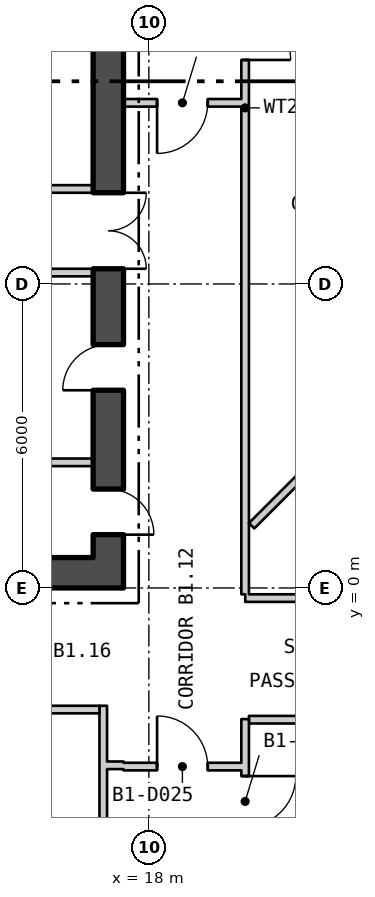
"""IFC4 building model, lengths in metres.
Left out: names, types, materials, properties, quantities, classifications, styles, units other than length and angle.
Written with IfcOpenShell. Run it as: python <this file> out.ifc"""

import sys

from ifc_helpers import new_model, si_unit, direction, frame, frame_2d, origin, place, context, subcontext, project, spatial, rectangle, extrude, element, fill, save


model = new_model("IFC4")
c1 = context("Model", 3, precision=1e-05, world=origin(), true_north=direction((0.0, 1.0)))
c2 = subcontext(c1, "Body", "Model", "MODEL_VIEW")
j1 = project(units=[si_unit("LENGTHUNIT", "METRE"), si_unit("PLANEANGLEUNIT", "RADIAN")], contexts=[c1])
p1 = place(None, origin())
s1 = spatial("IfcSite", under=j1, at=p1, CompositionType="ELEMENT")
p2 = place(p1, origin())
s2 = spatial("IfcBuilding", under=s1, at=p2, CompositionType="ELEMENT")
p3 = place(p2, frame((0.0, 0.0, -5.7)))
s3 = spatial("IfcBuildingStorey", under=s2, at=p3, CompositionType="ELEMENT", Elevation=-5.7)
p4 = place(p3, frame((-17.5, 0.3, 0.0), z_axis=(0.0, 0.0, 1.0), x_axis=(1.0, 0.0, 0.0)))
e1 = element("IfcWall", 1, at=p4, inside=s3, PredefinedType="SHEAR", context=c2, shape_type="SweptSolid", body=[
    extrude(rectangle(XDim=35.0, YDim=0.6, at=frame_2d((17.5, 0.0))), origin(), (0.0, 0.0, 1.0), 5.25),
])
p5 = place(p4, frame((12.0, 0.0, 0.0)))
e2 = element("IfcOpeningElement", 2, at=p5, cuts=e1, PredefinedType="OPENING", context=c2, shape_type="SweptSolid", body=[
    extrude(rectangle(XDim=1.8, YDim=2.4, at=frame_2d((0.9, 1.2))), frame((0.0, 0.31, 0.0), z_axis=(0.0, -1.0, 0.0), x_axis=(1.0, 0.0, 0.0)), (0.0, 0.0, 1.0), 0.62),
])
p6 = place(p4, frame((22.0, 0.0, 0.0)))
e3 = element("IfcOpeningElement", 3, at=p6, cuts=e1, PredefinedType="OPENING", context=c2, shape_type="SweptSolid", body=[
    extrude(rectangle(XDim=1.8, YDim=2.4, at=frame_2d((0.9, 1.2))), frame((0.0, 0.31, 0.0), z_axis=(0.0, -1.0, 0.0), x_axis=(1.0, 0.0, 0.0)), (0.0, 0.0, 1.0), 0.62),
])
p7 = place(p3, frame((17.2, 0.6, 0.0), z_axis=(0.0, 0.0, 1.0), x_axis=(0.0, 1.0, 0.0)))
e4 = element("IfcWall", 4, at=p7, inside=s3, PredefinedType="SHEAR", context=c2, shape_type="SweptSolid", body=[
    extrude(rectangle(XDim=16.8, YDim=0.6, at=frame_2d((8.4, 0.0))), origin(), (0.0, 0.0, 1.0), 5.25),
])
p8 = place(p7, frame((5.7, 0.0, 0.0)))
e5 = element("IfcOpeningElement", 5, at=p8, cuts=e4, PredefinedType="OPENING", context=c2, shape_type="SweptSolid", body=[
    extrude(rectangle(XDim=1.5, YDim=2.1, at=frame_2d((0.75, 1.05))), frame((0.0, 0.31, 0.0), z_axis=(0.0, -1.0, 0.0), x_axis=(1.0, 0.0, 0.0)), (0.0, 0.0, 1.0), 0.62),
])
p9 = place(p7, frame((0.452, 0.0, 0.0)))
e6 = element("IfcOpeningElement", 6, at=p9, cuts=e4, PredefinedType="OPENING", context=c2, shape_type="SweptSolid", body=[
    extrude(rectangle(XDim=0.9, YDim=2.1, at=frame_2d((0.45, 1.05))), frame((0.0, 0.31, 0.0), z_axis=(0.0, -1.0, 0.0), x_axis=(1.0, 0.0, 0.0)), (0.0, 0.0, 1.0), 0.62),
])
p10 = place(p7, frame((3.302, 0.0, 0.0)))
e7 = element("IfcOpeningElement", 7, at=p10, cuts=e4, PredefinedType="OPENING", context=c2, shape_type="SweptSolid", body=[
    extrude(rectangle(XDim=0.9, YDim=2.1, at=frame_2d((0.45, 1.05))), frame((0.0, 0.31, 0.0), z_axis=(0.0, -1.0, 0.0), x_axis=(1.0, 0.0, 0.0)), (0.0, 0.0, 1.0), 0.62),
])
p11 = place(p7, frame((10.697, 0.0, 0.0)))
e8 = element("IfcOpeningElement", 8, at=p11, cuts=e4, PredefinedType="OPENING", context=c2, shape_type="SweptSolid", body=[
    extrude(rectangle(XDim=0.9, YDim=2.1, at=frame_2d((0.45, 1.05))), frame((0.0, 0.31, 0.0), z_axis=(0.0, -1.0, 0.0), x_axis=(1.0, 0.0, 0.0)), (0.0, 0.0, 1.0), 0.62),
])
p12 = place(p7, frame((15.4, 0.0, 0.0)))
e9 = element("IfcOpeningElement", 9, at=p12, cuts=e4, PredefinedType="OPENING", context=c2, shape_type="SweptSolid", body=[
    extrude(rectangle(XDim=1.0, YDim=2.1, at=frame_2d((0.5, 1.05))), frame((0.0, 0.31, 0.0), z_axis=(0.0, -1.0, 0.0), x_axis=(1.0, 0.0, 0.0)), (0.0, 0.0, 1.0), 0.62),
])
for number, where, z_axis, x_axis in (
    (10, (14.5, 6.225, 0.0), (0.0, 0.0, 1.0), (1.0, 0.0, 0.0)),
    (11, (14.5, 7.875, 0.0), (0.0, 0.0, 1.0), (1.0, 0.0, 0.0)),
    (12, (14.5, 2.479, 0.0), (0.0, 0.0, 1.0), (1.0, 0.0, 0.0)),
):
    element("IfcWall", number, at=place(p3, frame(where, z_axis=z_axis, x_axis=x_axis)), inside=s3, PredefinedType="PARTITIONING", context=c2, shape_type="SweptSolid", body=[
        extrude(rectangle(XDim=2.4, YDim=0.15, at=frame_2d((1.2, 0.0))), origin(), (0.0, 0.0, 1.0), 5.25),
    ])
p13 = place(p3, frame((11.575, -2.4, 0.0), z_axis=(0.0, 0.0, 1.0), x_axis=(1.0, 0.0, 0.0)))
e13 = element("IfcWall", 13, at=p13, inside=s3, PredefinedType="PARTITIONING", context=c2, shape_type="SweptSolid", body=[
    extrude(rectangle(XDim=5.45, YDim=0.15, at=frame_2d((2.725, 0.0))), origin(), (0.0, 0.0, 1.0), 5.25),
])
p14 = place(p13, frame((2.804, 0.0, 0.0)))
e14 = element("IfcOpeningElement", 14, at=p14, cuts=e13, PredefinedType="OPENING", context=c2, shape_type="SweptSolid", body=[
    extrude(rectangle(XDim=1.0, YDim=2.1, at=frame_2d((0.5, 1.05))), frame((0.0, 0.085, 0.0), z_axis=(0.0, -1.0, 0.0), x_axis=(1.0, 0.0, 0.0)), (0.0, 0.0, 1.0), 0.17),
])
p15 = place(p3, frame((17.1, -21.375, 0.0), z_axis=(0.0, 0.0, 1.0), x_axis=(0.0, 1.0, 0.0)))
e15 = element("IfcWall", 15, at=p15, inside=s3, PredefinedType="PARTITIONING", context=c2, shape_type="SweptSolid", body=[
    extrude(rectangle(XDim=19.05, YDim=0.15, at=frame_2d((9.525, 0.0))), origin(), (0.0, 0.0, 1.0), 5.25),
])
p16 = place(p3, frame((17.175, -3.5, 0.0), z_axis=(0.0, 0.0, 1.0), x_axis=(1.0, 0.0, 0.0)))
e16 = element("IfcWall", 16, at=p16, inside=s3, PredefinedType="PARTITIONING", context=c2, shape_type="SweptSolid", body=[
    extrude(rectangle(XDim=0.325, YDim=0.15, at=frame_2d((0.163, 0.0))), origin(), (0.0, 0.0, 1.0), 5.25),
])
p17 = place(p3, frame((17.5, -3.525, 0.0), z_axis=(0.0, 0.0, 1.0), x_axis=(1.0, 0.0, 0.0)))
e17 = element("IfcWall", 17, at=p17, inside=s3, PredefinedType="PARTITIONING", context=c2, shape_type="SweptSolid", body=[
    extrude(rectangle(XDim=2.325, YDim=0.15, at=frame_2d((1.163, 0.0))), origin(), (0.0, 0.0, 1.0), 5.25),
])
p18 = place(p17, frame((0.662, 0.0, 0.0)))
e18 = element("IfcOpeningElement", 18, at=p18, cuts=e17, PredefinedType="OPENING", context=c2, shape_type="SweptSolid", body=[
    extrude(rectangle(XDim=1.0, YDim=2.1, at=frame_2d((0.5, 1.05))), frame((0.0, 0.085, 0.0), z_axis=(0.0, -1.0, 0.0), x_axis=(1.0, 0.0, 0.0)), (0.0, 0.0, 1.0), 0.17),
])
p19 = place(p3, frame((17.5, 9.575, 0.0), z_axis=(0.0, 0.0, 1.0), x_axis=(1.0, 0.0, 0.0)))
e19 = element("IfcWall", 19, at=p19, inside=s3, PredefinedType="PARTITIONING", context=c2, shape_type="SweptSolid", body=[
    extrude(rectangle(XDim=2.325, YDim=0.15, at=frame_2d((1.163, 0.0))), origin(), (0.0, 0.0, 1.0), 5.25),
])
p20 = place(p19, frame((0.662, 0.0, 0.0)))
e20 = element("IfcOpeningElement", 20, at=p20, cuts=e19, PredefinedType="OPENING", context=c2, shape_type="SweptSolid", body=[
    extrude(rectangle(XDim=1.0, YDim=2.1, at=frame_2d((0.5, 1.05))), frame((0.0, 0.085, 0.0), z_axis=(0.0, -1.0, 0.0), x_axis=(1.0, 0.0, 0.0)), (0.0, 0.0, 1.0), 0.17),
])
p21 = place(p3, frame((19.9, -23.775, 0.0), z_axis=(0.0, 0.0, 1.0), x_axis=(0.0, 1.0, 0.0)))
e21 = element("IfcWall", 21, at=p21, inside=s3, PredefinedType="PARTITIONING", context=c2, shape_type="SweptSolid", body=[
    extrude(rectangle(XDim=21.187, YDim=0.15, at=frame_2d((10.594, 0.0))), origin(), (0.0, 0.0, 1.0), 5.25),
])
p22 = place(p21, frame((4.987, 0.0, 0.0)))
e22 = element("IfcOpeningElement", 22, at=p22, cuts=e21, PredefinedType="OPENING", context=c2, shape_type="SweptSolid", body=[
    extrude(rectangle(XDim=1.0, YDim=2.1, at=frame_2d((0.5, 1.05))), frame((0.0, 0.085, 0.0), z_axis=(0.0, -1.0, 0.0), x_axis=(1.0, 0.0, 0.0)), (0.0, 0.0, 1.0), 0.17),
])
p23 = place(p21, frame((9.886, 0.0, 0.0)))
e23 = element("IfcOpeningElement", 23, at=p23, cuts=e21, PredefinedType="OPENING", context=c2, shape_type="SweptSolid", body=[
    extrude(rectangle(XDim=1.8, YDim=2.1, at=frame_2d((0.9, 1.05))), frame((0.0, 0.085, 0.0), z_axis=(0.0, -1.0, 0.0), x_axis=(1.0, 0.0, 0.0)), (0.0, 0.0, 1.0), 0.17),
])
p24 = place(p21, frame((14.973, 0.0, 0.0)))
e24 = element("IfcOpeningElement", 24, at=p24, cuts=e21, PredefinedType="OPENING", context=c2, shape_type="SweptSolid", body=[
    extrude(rectangle(XDim=1.8, YDim=2.1, at=frame_2d((0.9, 1.05))), frame((0.0, 0.085, 0.0), z_axis=(0.0, -1.0, 0.0), x_axis=(1.0, 0.0, 0.0)), (0.0, 0.0, 1.0), 0.17),
])
p25 = place(p21, frame((19.062, 0.0, 0.0)))
e25 = element("IfcOpeningElement", 25, at=p25, cuts=e21, PredefinedType="OPENING", context=c2, shape_type="SweptSolid", body=[
    extrude(rectangle(XDim=1.0, YDim=2.1, at=frame_2d((0.5, 1.05))), frame((0.0, 0.085, 0.0), z_axis=(0.0, -1.0, 0.0), x_axis=(1.0, 0.0, 0.0)), (0.0, 0.0, 1.0), 0.17),
])
p26 = place(p3, frame((19.9, -0.125, 0.0), z_axis=(0.0, 0.0, 1.0), x_axis=(0.0, 1.0, 0.0)))
e26 = element("IfcWall", 26, at=p26, inside=s3, PredefinedType="PARTITIONING", context=c2, shape_type="SweptSolid", body=[
    extrude(rectangle(XDim=1.15, YDim=0.15, at=frame_2d((0.575, 0.0))), origin(), (0.0, 0.0, 1.0), 5.25),
])
p27 = place(p3, frame((19.9, 1.025, 0.0), z_axis=(0.0, 0.0, 1.0), x_axis=(0.0, 1.0, 0.0)))
e27 = element("IfcWall", 27, at=p27, inside=s3, PredefinedType="PARTITIONING", context=c2, shape_type="SweptSolid", body=[
    extrude(rectangle(XDim=16.9, YDim=0.15, at=frame_2d((8.45, 0.0))), origin(), (0.0, 0.0, 1.0), 5.25),
])
p28 = place(p27, frame((9.396, 0.0, 0.0)))
e28 = element("IfcOpeningElement", 28, at=p28, cuts=e27, PredefinedType="OPENING", context=c2, shape_type="SweptSolid", body=[
    extrude(rectangle(XDim=1.8, YDim=2.1, at=frame_2d((0.9, 1.05))), frame((0.0, 0.085, 0.0), z_axis=(0.0, -1.0, 0.0), x_axis=(1.0, 0.0, 0.0)), (0.0, 0.0, 1.0), 0.17),
])
p29 = place(p27, frame((13.027, 0.0, 0.0)))
e29 = element("IfcOpeningElement", 29, at=p29, cuts=e27, PredefinedType="OPENING", context=c2, shape_type="SweptSolid", body=[
    extrude(rectangle(XDim=1.0, YDim=2.1, at=frame_2d((0.5, 1.05))), frame((0.0, 0.085, 0.0), z_axis=(0.0, -1.0, 0.0), x_axis=(1.0, 0.0, 0.0)), (0.0, 0.0, 1.0), 0.17),
])
p30 = place(p3, frame((19.902, -0.2, 0.0), z_axis=(0.0, 0.0, 1.0), x_axis=(1.0, 0.0, 0.0)))
e30 = element("IfcWall", 30, at=p30, inside=s3, PredefinedType="PARTITIONING", context=c2, shape_type="SweptSolid", body=[
    extrude(rectangle(XDim=6.848, YDim=0.15, at=frame_2d((3.424, 0.0))), origin(), (0.0, 0.0, 1.0), 5.25),
])
p31 = place(p30, frame((1.713, 0.0, 0.0)))
e31 = element("IfcOpeningElement", 31, at=p31, cuts=e30, PredefinedType="OPENING", context=c2, shape_type="SweptSolid", body=[
    extrude(rectangle(XDim=1.0, YDim=2.1, at=frame_2d((0.5, 1.05))), frame((0.0, 0.085, 0.0), z_axis=(0.0, -1.0, 0.0), x_axis=(1.0, 0.0, 0.0)), (0.0, 0.0, 1.0), 0.17),
])
p32 = place(p3, frame((19.975, -2.6, 0.0), z_axis=(0.0, 0.0, 1.0), x_axis=(1.0, 0.0, 0.0)))
e32 = element("IfcWall", 32, at=p32, inside=s3, PredefinedType="PARTITIONING", context=c2, shape_type="SweptSolid", body=[
    extrude(rectangle(XDim=2.282, YDim=0.15, at=frame_2d((1.141, 0.0))), origin(), (0.0, 0.0, 1.0), 5.25),
])
p33 = place(p3, frame((20.028, 1.228, 0.0), z_axis=(0.0, 0.0, 1.0), x_axis=(0.707106781187, 0.707106781187, 0.0)))
e33 = element("IfcWall", 33, at=p33, inside=s3, PredefinedType="PARTITIONING", context=c2, shape_type="SweptSolid", body=[
    extrude(rectangle(XDim=7.586, YDim=0.15, at=frame_2d((3.793, 0.0))), origin(), (0.0, 0.0, 1.0), 5.25),
])
p34 = place(p8, origin())
e34 = element("IfcDoor", 34, at=p34, inside=s3, OperationType="DOUBLE_DOOR_SINGLE_SWING", PredefinedType="DOOR", context=c2, shape_type="SweptSolid", body=[
    extrude(rectangle(XDim=1.5, YDim=2.1, at=frame_2d((0.75, 1.05))), frame((0.0, 0.025, 0.0), z_axis=(0.0, -1.0, 0.0), x_axis=(1.0, 0.0, 0.0)), (0.0, 0.0, 1.0), 0.05),
])
fill(e5, e34)
p35 = place(p9, origin())
e35 = element("IfcDoor", 35, at=p35, inside=s3, OperationType="SINGLE_SWING_LEFT", PredefinedType="DOOR", context=c2, shape_type="SweptSolid", body=[
    extrude(rectangle(XDim=0.9, YDim=2.1, at=frame_2d((0.45, 1.05))), frame((0.0, 0.025, 0.0), z_axis=(0.0, -1.0, 0.0), x_axis=(1.0, 0.0, 0.0)), (0.0, 0.0, 1.0), 0.05),
])
fill(e6, e35)
p36 = place(p10, origin())
e36 = element("IfcDoor", 36, at=p36, inside=s3, OperationType="SINGLE_SWING_RIGHT", PredefinedType="DOOR", context=c2, shape_type="SweptSolid", body=[
    extrude(rectangle(XDim=0.9, YDim=2.1, at=frame_2d((0.45, 1.05))), frame((0.0, 0.025, 0.0), z_axis=(0.0, -1.0, 0.0), x_axis=(1.0, 0.0, 0.0)), (0.0, 0.0, 1.0), 0.05),
])
fill(e7, e36)
p37 = place(p18, origin())
e37 = element("IfcDoor", 37, at=p37, inside=s3, OperationType="SINGLE_SWING_RIGHT", PredefinedType="DOOR", context=c2, shape_type="SweptSolid", body=[
    extrude(rectangle(XDim=1.0, YDim=2.1, at=frame_2d((0.5, 1.05))), frame((0.0, 0.025, 0.0), z_axis=(0.0, -1.0, 0.0), x_axis=(1.0, 0.0, 0.0)), (0.0, 0.0, 1.0), 0.05),
])
fill(e18, e37)
p38 = place(p20, origin())
e38 = element("IfcDoor", 38, at=p38, inside=s3, OperationType="SINGLE_SWING_LEFT", PredefinedType="DOOR", context=c2, shape_type="SweptSolid", body=[
    extrude(rectangle(XDim=1.0, YDim=2.1, at=frame_2d((0.5, 1.05))), frame((0.0, 0.025, 0.0), z_axis=(0.0, -1.0, 0.0), x_axis=(1.0, 0.0, 0.0)), (0.0, 0.0, 1.0), 0.05),
])
fill(e20, e38)
p39 = place(p25, origin())
e39 = element("IfcDoor", 39, at=p39, inside=s3, OperationType="SINGLE_SWING_RIGHT", PredefinedType="DOOR", context=c2, shape_type="SweptSolid", body=[
    extrude(rectangle(XDim=1.0, YDim=2.1, at=frame_2d((0.5, 1.05))), frame((0.0, 0.025, 0.0), z_axis=(0.0, -1.0, 0.0), x_axis=(1.0, 0.0, 0.0)), (0.0, 0.0, 1.0), 0.05),
])
fill(e25, e39)
p40 = place(p28, origin())
e40 = element("IfcDoor", 40, at=p40, inside=s3, OperationType="DOUBLE_DOOR_SINGLE_SWING", PredefinedType="DOOR", context=c2, shape_type="SweptSolid", body=[
    extrude(rectangle(XDim=1.8, YDim=2.1, at=frame_2d((0.9, 1.05))), frame((0.0, 0.025, 0.0), z_axis=(0.0, -1.0, 0.0), x_axis=(1.0, 0.0, 0.0)), (0.0, 0.0, 1.0), 0.05),
])
fill(e28, e40)
save(model, sys.argv[1])
